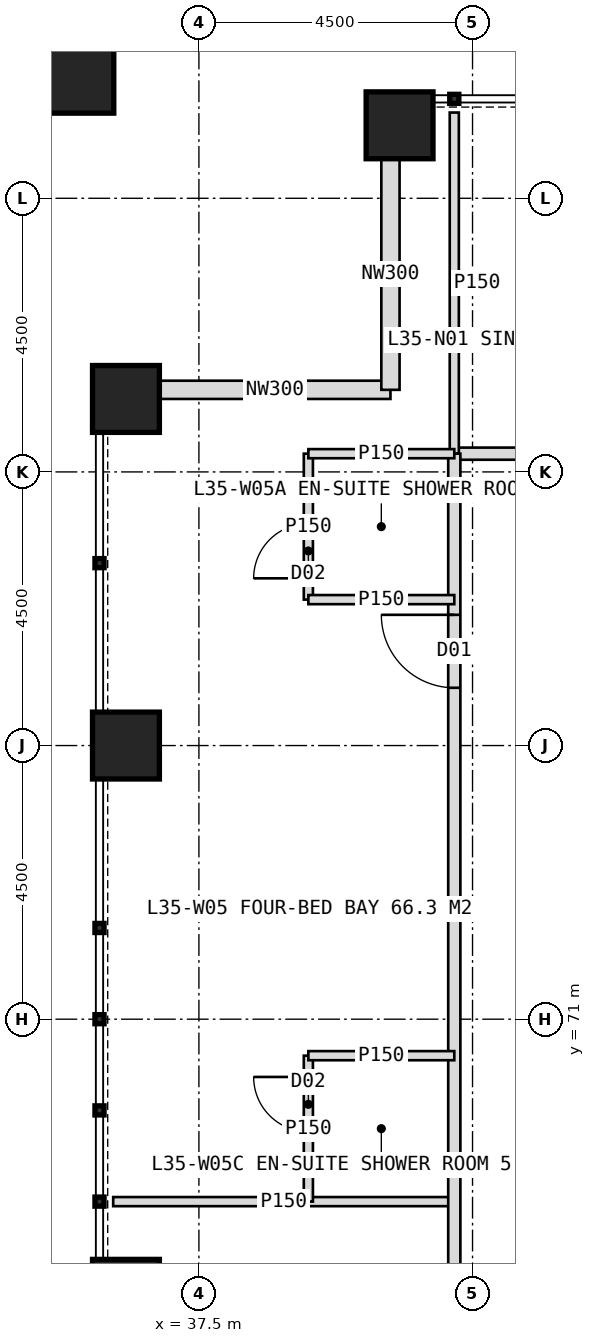
"""IFC4 building model, lengths in metres.
Left out: names, types, materials, properties, quantities, classifications, styles, units other than length and angle.
Written with IfcOpenShell. Run it as: python <this file> out.ifc"""

import sys

from ifc_helpers import new_model, si_unit, direction, frame, frame_2d, origin, origin_2d, place, context, subcontext, project, spatial, rectangle, hollow_rectangle, extrude, element, fill, save


model = new_model("IFC4")
c1 = context("Model", 3, precision=1e-05, world=origin(), true_north=direction((0.0, 1.0)))
c2 = subcontext(c1, "Body", "Model", "MODEL_VIEW")
j1 = project(units=[si_unit("LENGTHUNIT", "METRE"), si_unit("PLANEANGLEUNIT", "RADIAN")], contexts=[c1])
p1 = place(None, origin())
s1 = spatial("IfcSite", under=j1, at=p1, CompositionType="ELEMENT")
p2 = place(p1, origin())
s2 = spatial("IfcBuilding", under=s1, at=p2, CompositionType="ELEMENT")
p3 = place(p2, frame((0.0, 0.0, 148.0)))
s3 = spatial("IfcBuildingStorey", under=s2, at=p3, CompositionType="ELEMENT", Elevation=148.0)
for number, where, z_axis, x_axis in (
    (1, (40.8, 85.7, 0.0), (0.0, 0.0, 1.0), (1.0, 0.0, 0.0)),
    (2, (36.3, 66.5, 0.0), (0.0, 0.0, 1.0), (1.0, 0.0, 0.0)),
    (3, (36.3, 75.5, 0.0), (0.0, 0.0, 1.0), (1.0, 0.0, 0.0)),
    (4, (36.3, 81.2, 0.0), (0.0, 0.0, 1.0), (1.0, 0.0, 0.0)),
):
    element("IfcColumn", number, at=place(p3, frame(where, z_axis=z_axis, x_axis=x_axis)), inside=s3, PredefinedType="COLUMN", context=c2, shape_type="SweptSolid", body=[
        extrude(hollow_rectangle(XDim=1.1, YDim=1.1, WallThickness=0.1, at=origin_2d()), origin(), (0.0, 0.0, 1.0), 4.0),
    ])
p4 = place(p3, frame((35.4, 86.6, 0.0), z_axis=(0.0, 0.0, 1.0), x_axis=(1.0, 0.0, 0.0)))
e5 = element("IfcColumn", 5, at=p4, inside=s3, PredefinedType="COLUMN", context=c2, shape_type="SweptSolid", body=[
    extrude(hollow_rectangle(XDim=1.4, YDim=1.4, WallThickness=0.08, at=origin_2d()), origin(), (0.0, 0.0, 1.0), 4.0),
])
for number, where, z_axis, x_axis in (
    (6, (36.85, 81.35, 0.0), (0.0, 0.0, 1.0), (1.0, 0.0, 0.0)),
    (7, (40.65, 81.35, 0.0), (0.0, 0.0, 1.0), (0.0, 1.0, 0.0)),
):
    element("IfcWall", number, at=place(p3, frame(where, z_axis=z_axis, x_axis=x_axis)), inside=s3, PredefinedType="ELEMENTEDWALL", context=c2, shape_type="SweptSolid", body=[
        extrude(rectangle(XDim=3.8, YDim=0.3, at=frame_2d((1.9, 0.0))), origin(), (0.0, 0.0, 1.0), 4.0),
    ])
p5 = place(p3, frame((41.7, 80.3, 0.0), z_axis=(0.0, 0.0, 1.0), x_axis=(1.0, 0.0, 0.0)))
e8 = element("IfcWall", 8, at=p5, inside=s3, PredefinedType="PARTITIONING", context=c2, shape_type="SweptSolid", body=[
    extrude(rectangle(XDim=36.6, YDim=0.2, at=frame_2d((18.3, 0.0))), origin(), (0.0, 0.0, 1.0), 3.75),
])
p6 = place(p5, frame((3.35, 0.0, 0.0)))
e9 = element("IfcOpeningElement", 9, at=p6, cuts=e8, PredefinedType="OPENING", context=c2, shape_type="SweptSolid", body=[
    extrude(rectangle(XDim=1.2, YDim=2.2, at=frame_2d((0.6, 1.1))), frame((0.0, 0.11, 0.0), z_axis=(0.0, -1.0, 0.0), x_axis=(1.0, 0.0, 0.0)), (0.0, 0.0, 1.0), 0.22),
])
p7 = place(p5, frame((8.8, 0.0, 0.0)))
e10 = element("IfcOpeningElement", 10, at=p7, cuts=e8, PredefinedType="OPENING", context=c2, shape_type="SweptSolid", body=[
    extrude(rectangle(XDim=1.0, YDim=2.1, at=frame_2d((0.5, 1.05))), frame((0.0, 0.11, 0.0), z_axis=(0.0, -1.0, 0.0), x_axis=(1.0, 0.0, 0.0)), (0.0, 0.0, 1.0), 0.22),
])
p8 = place(p5, frame((15.35, 0.0, 0.0)))
e11 = element("IfcOpeningElement", 11, at=p8, cuts=e8, PredefinedType="OPENING", context=c2, shape_type="SweptSolid", body=[
    extrude(rectangle(XDim=1.2, YDim=2.2, at=frame_2d((0.6, 1.1))), frame((0.0, 0.11, 0.0), z_axis=(0.0, -1.0, 0.0), x_axis=(1.0, 0.0, 0.0)), (0.0, 0.0, 1.0), 0.22),
])
p9 = place(p5, frame((22.45, 0.0, 0.0)))
e12 = element("IfcOpeningElement", 12, at=p9, cuts=e8, PredefinedType="OPENING", context=c2, shape_type="SweptSolid", body=[
    extrude(rectangle(XDim=1.2, YDim=2.2, at=frame_2d((0.6, 1.1))), frame((0.0, 0.11, 0.0), z_axis=(0.0, -1.0, 0.0), x_axis=(1.0, 0.0, 0.0)), (0.0, 0.0, 1.0), 0.22),
])
for number, where, z_axis, x_axis in (
    (13, (41.7, 80.3, 0.0), (0.0, 0.0, 1.0), (0.0, 1.0, 0.0)),
    (14, (41.7, 68.0, 0.0), (0.0, 0.0, 1.0), (-1.0, 0.0, 0.0)),
):
    element("IfcWall", number, at=place(p3, frame(where, z_axis=z_axis, x_axis=x_axis)), inside=s3, PredefinedType="PARTITIONING", context=c2, shape_type="SweptSolid", body=[
        extrude(rectangle(XDim=5.61, YDim=0.15, at=frame_2d((2.805, 0.0))), origin(), (0.0, 0.0, 1.0), 3.75),
    ])
p10 = place(p3, frame((41.7, 43.7, 0.0), z_axis=(0.0, 0.0, 1.0), x_axis=(0.0, 1.0, 0.0)))
e15 = element("IfcWall", 15, at=p10, inside=s3, PredefinedType="PARTITIONING", context=c2, shape_type="SweptSolid", body=[
    extrude(rectangle(XDim=36.6, YDim=0.2, at=frame_2d((18.3, 0.0))), origin(), (0.0, 0.0, 1.0), 3.75),
])
p11 = place(p10, frame((3.35, 0.0, 0.0)))
e16 = element("IfcOpeningElement", 16, at=p11, cuts=e15, PredefinedType="OPENING", context=c2, shape_type="SweptSolid", body=[
    extrude(rectangle(XDim=1.2, YDim=2.2, at=frame_2d((0.6, 1.1))), frame((0.0, 0.11, 0.0), z_axis=(0.0, -1.0, 0.0), x_axis=(1.0, 0.0, 0.0)), (0.0, 0.0, 1.0), 0.22),
])
p12 = place(p10, frame((11.05, 0.0, 0.0)))
e17 = element("IfcOpeningElement", 17, at=p12, cuts=e15, PredefinedType="OPENING", context=c2, shape_type="SweptSolid", body=[
    extrude(rectangle(XDim=1.2, YDim=2.2, at=frame_2d((0.6, 1.1))), frame((0.0, 0.11, 0.0), z_axis=(0.0, -1.0, 0.0), x_axis=(1.0, 0.0, 0.0)), (0.0, 0.0, 1.0), 0.22),
])
p13 = place(p10, frame((16.3, 0.0, 0.0)))
e18 = element("IfcOpeningElement", 18, at=p13, cuts=e15, PredefinedType="OPENING", context=c2, shape_type="SweptSolid", body=[
    extrude(rectangle(XDim=1.0, YDim=2.1, at=frame_2d((0.5, 1.05))), frame((0.0, 0.11, 0.0), z_axis=(0.0, -1.0, 0.0), x_axis=(1.0, 0.0, 0.0)), (0.0, 0.0, 1.0), 0.22),
])
p14 = place(p10, frame((20.95, 0.0, 0.0)))
e19 = element("IfcOpeningElement", 19, at=p14, cuts=e15, PredefinedType="OPENING", context=c2, shape_type="SweptSolid", body=[
    extrude(rectangle(XDim=1.2, YDim=2.2, at=frame_2d((0.6, 1.1))), frame((0.0, 0.11, 0.0), z_axis=(0.0, -1.0, 0.0), x_axis=(1.0, 0.0, 0.0)), (0.0, 0.0, 1.0), 0.22),
])
p15 = place(p10, frame((32.75, 0.0, 0.0)))
e20 = element("IfcOpeningElement", 20, at=p15, cuts=e15, PredefinedType="OPENING", context=c2, shape_type="SweptSolid", body=[
    extrude(rectangle(XDim=1.2, YDim=2.2, at=frame_2d((0.6, 1.1))), frame((0.0, 0.11, 0.0), z_axis=(0.0, -1.0, 0.0), x_axis=(1.0, 0.0, 0.0)), (0.0, 0.0, 1.0), 0.22),
])
p16 = place(p3, frame((39.3, 77.9, 0.0), z_axis=(0.0, 0.0, 1.0), x_axis=(0.0, 1.0, 0.0)))
e21 = element("IfcWall", 21, at=p16, inside=s3, PredefinedType="PARTITIONING", context=c2, shape_type="SweptSolid", body=[
    extrude(rectangle(XDim=2.4, YDim=0.15, at=frame_2d((1.2, 0.0))), origin(), (0.0, 0.0, 1.0), 3.75),
])
p17 = place(p16, frame((0.35, 0.0, 0.0)))
e22 = element("IfcOpeningElement", 22, at=p17, cuts=e21, PredefinedType="OPENING", context=c2, shape_type="SweptSolid", body=[
    extrude(rectangle(XDim=0.9, YDim=2.1, at=frame_2d((0.45, 1.05))), frame((0.0, 0.085, 0.0), z_axis=(0.0, -1.0, 0.0), x_axis=(1.0, 0.0, 0.0)), (0.0, 0.0, 1.0), 0.17),
])
p18 = place(p3, frame((41.7, 77.9, 0.0), z_axis=(0.0, 0.0, 1.0), x_axis=(-1.0, 0.0, 0.0)))
e23 = element("IfcWall", 23, at=p18, inside=s3, PredefinedType="PARTITIONING", context=c2, shape_type="SweptSolid", body=[
    extrude(rectangle(XDim=2.4, YDim=0.15, at=frame_2d((1.2, 0.0))), origin(), (0.0, 0.0, 1.0), 3.75),
])
p19 = place(p3, frame((39.3, 68.0, 0.0), z_axis=(0.0, 0.0, 1.0), x_axis=(0.0, 1.0, 0.0)))
e24 = element("IfcWall", 24, at=p19, inside=s3, PredefinedType="PARTITIONING", context=c2, shape_type="SweptSolid", body=[
    extrude(rectangle(XDim=2.4, YDim=0.15, at=frame_2d((1.2, 0.0))), origin(), (0.0, 0.0, 1.0), 3.75),
])
p20 = place(p19, frame((1.15, 0.0, 0.0)))
e25 = element("IfcOpeningElement", 25, at=p20, cuts=e24, PredefinedType="OPENING", context=c2, shape_type="SweptSolid", body=[
    extrude(rectangle(XDim=0.9, YDim=2.1, at=frame_2d((0.45, 1.05))), frame((0.0, 0.085, 0.0), z_axis=(0.0, -1.0, 0.0), x_axis=(1.0, 0.0, 0.0)), (0.0, 0.0, 1.0), 0.17),
])
for number, where, z_axis, x_axis in (
    (26, (41.7, 70.4, 0.0), (0.0, 0.0, 1.0), (-1.0, 0.0, 0.0)),
    (27, (41.7, 80.3, 0.0), (0.0, 0.0, 1.0), (-1.0, 0.0, 0.0)),
):
    element("IfcWall", number, at=place(p3, frame(where, z_axis=z_axis, x_axis=x_axis)), inside=s3, PredefinedType="PARTITIONING", context=c2, shape_type="SweptSolid", body=[
        extrude(rectangle(XDim=2.4, YDim=0.15, at=frame_2d((1.2, 0.0))), origin(), (0.0, 0.0, 1.0), 3.75),
    ])
p21 = place(p15, origin())
e28 = element("IfcDoor", 28, at=p21, inside=s3, OperationType="SINGLE_SWING_RIGHT", PredefinedType="DOOR", context=c2, shape_type="SweptSolid", body=[
    extrude(rectangle(XDim=1.2, YDim=2.2, at=frame_2d((0.6, 1.1))), frame((0.0, 0.025, 0.0), z_axis=(0.0, -1.0, 0.0), x_axis=(1.0, 0.0, 0.0)), (0.0, 0.0, 1.0), 0.05),
])
fill(e20, e28)
p22 = place(p17, origin())
e29 = element("IfcDoor", 29, at=p22, inside=s3, OperationType="SINGLE_SWING_LEFT", PredefinedType="DOOR", context=c2, shape_type="SweptSolid", body=[
    extrude(rectangle(XDim=0.9, YDim=2.1, at=frame_2d((0.45, 1.05))), frame((0.0, 0.025, 0.0), z_axis=(0.0, -1.0, 0.0), x_axis=(1.0, 0.0, 0.0)), (0.0, 0.0, 1.0), 0.05),
])
fill(e22, e29)
p23 = place(p20, origin())
e30 = element("IfcDoor", 30, at=p23, inside=s3, OperationType="SINGLE_SWING_RIGHT", PredefinedType="DOOR", context=c2, shape_type="SweptSolid", body=[
    extrude(rectangle(XDim=0.9, YDim=2.1, at=frame_2d((0.45, 1.05))), frame((0.0, 0.025, 0.0), z_axis=(0.0, -1.0, 0.0), x_axis=(1.0, 0.0, 0.0)), (0.0, 0.0, 1.0), 0.05),
])
fill(e25, e30)
save(model, sys.argv[1])
